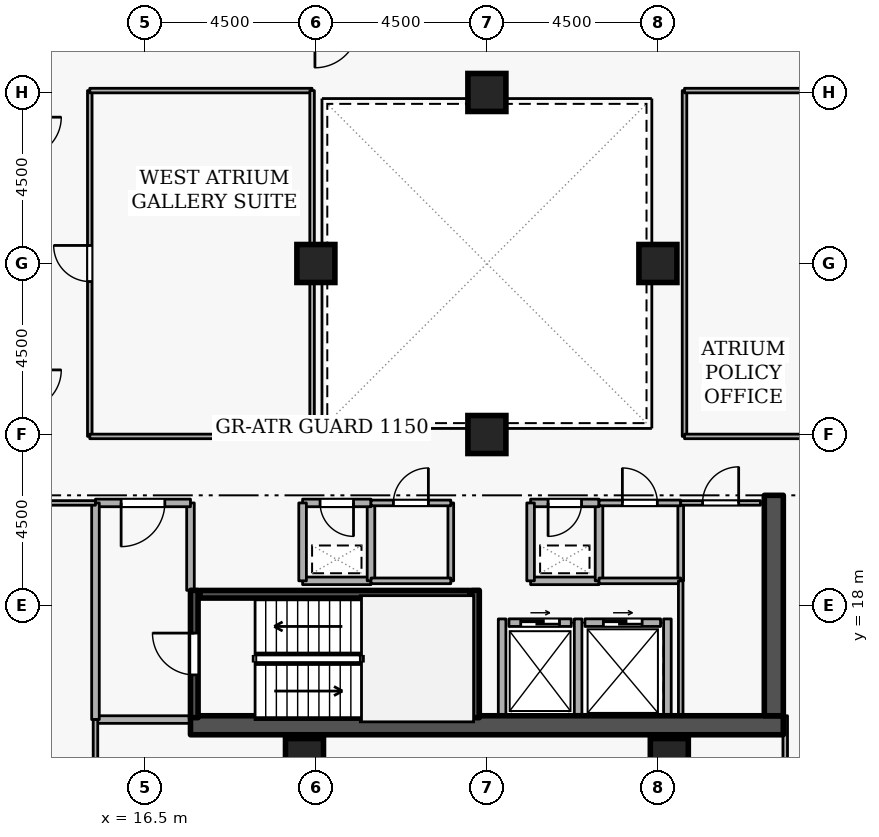
"""IFC4 building model, lengths in metres.
Left out: names, types, materials, properties, quantities, classifications, styles, units other than length and angle.
Written with IfcOpenShell. Run it as: python <this file> out.ifc"""

import sys

from ifc_helpers import new_model, si_unit, direction, frame, frame_2d, origin, origin_2d, place, context, subcontext, project, spatial, rectangle, extrude, element, fill, save


model = new_model("IFC4")
c1 = context("Model", 3, precision=1e-05, world=origin(), true_north=direction((0.0, 1.0)))
c2 = subcontext(c1, "Body", "Model", "MODEL_VIEW")
j1 = project(units=[si_unit("LENGTHUNIT", "METRE"), si_unit("PLANEANGLEUNIT", "RADIAN")], contexts=[c1])
p1 = place(None, origin())
s1 = spatial("IfcSite", under=j1, at=p1, CompositionType="ELEMENT")
p2 = place(p1, origin())
s2 = spatial("IfcBuilding", under=s1, at=p2, CompositionType="ELEMENT")
p3 = place(p2, frame((0.0, 0.0, 200.1)))
s3 = spatial("IfcBuildingStorey", under=s2, at=p3, CompositionType="ELEMENT", Elevation=200.1)
p4 = place(p3, frame((17.7, 14.85, 0.0), z_axis=(0.0, 0.0, 1.0), x_axis=(1.0, 0.0, 0.0)))
e1 = element("IfcWall", 1, at=p4, inside=s3, PredefinedType="SHEAR", context=c2, shape_type="SweptSolid", body=[
    extrude(rectangle(XDim=15.6, YDim=0.5, at=frame_2d((7.8, 0.0))), origin(), (0.0, 0.0, 1.0), 3.6),
])
p5 = place(p3, frame((33.05, 15.1, 0.0), z_axis=(0.0, 0.0, 1.0), x_axis=(0.0, 1.0, 0.0)))
e2 = element("IfcWall", 2, at=p5, inside=s3, PredefinedType="SHEAR", context=c2, shape_type="SweptSolid", body=[
    extrude(rectangle(XDim=5.8, YDim=0.5, at=frame_2d((2.9, 0.0))), origin(), (0.0, 0.0, 1.0), 3.6),
])
for number, where, z_axis, x_axis in (
    (3, (20.7, 14.0, 0.0), (0.0, 0.0, 1.0), (1.0, 0.0, 0.0)),
    (4, (30.3, 14.0, 0.0), (0.0, 0.0, 1.0), (1.0, 0.0, 0.0)),
    (5, (25.5, 22.5, 0.0), (0.0, 0.0, 1.0), (1.0, 0.0, 0.0)),
    (6, (25.5, 31.5, 0.0), (0.0, 0.0, 1.0), (1.0, 0.0, 0.0)),
    (7, (21.0, 27.0, 0.0), (0.0, 0.0, 1.0), (1.0, 0.0, 0.0)),
    (8, (30.0, 27.0, 0.0), (0.0, 0.0, 1.0), (1.0, 0.0, 0.0)),
):
    element("IfcColumn", number, at=place(p3, frame(where, z_axis=z_axis, x_axis=x_axis)), inside=s3, PredefinedType="COLUMN", context=c2, shape_type="SweptSolid", body=[
        extrude(rectangle(XDim=1.0, YDim=1.0, at=origin_2d()), origin(), (0.0, 0.0, 1.0), 3.6),
    ])
p6 = place(p3, frame((26.08, 17.55, 0.0), z_axis=(0.0, 0.0, 1.0), x_axis=(1.0, 0.0, 0.0)))
e9 = element("IfcWall", 9, at=p6, inside=s3, PredefinedType="STANDARD", context=c2, shape_type="SweptSolid", body=[
    extrude(rectangle(XDim=1.64, YDim=0.2, at=frame_2d((0.82, 0.0))), origin(), (0.0, 0.0, 1.0), 3.32),
])
p7 = place(p6, frame((0.31, 0.0, 0.0)))
e10 = element("IfcOpeningElement", 10, at=p7, cuts=e9, PredefinedType="OPENING", context=c2, shape_type="SweptSolid", body=[
    extrude(rectangle(XDim=1.02, YDim=2.06, at=frame_2d((0.51, 1.03))), frame((0.0, 0.11, 0.0), z_axis=(0.0, -1.0, 0.0), x_axis=(1.0, 0.0, 0.0)), (0.0, 0.0, 1.0), 0.22),
])
p8 = place(p3, frame((28.08, 17.55, 0.0), z_axis=(0.0, 0.0, 1.0), x_axis=(1.0, 0.0, 0.0)))
e11 = element("IfcWall", 11, at=p8, inside=s3, PredefinedType="STANDARD", context=c2, shape_type="SweptSolid", body=[
    extrude(rectangle(XDim=1.99, YDim=0.2, at=frame_2d((0.995, 0.0))), origin(), (0.0, 0.0, 1.0), 3.32),
])
p9 = place(p8, frame((0.485, 0.0, 0.0)))
e12 = element("IfcOpeningElement", 12, at=p9, cuts=e11, PredefinedType="OPENING", context=c2, shape_type="SweptSolid", body=[
    extrude(rectangle(XDim=1.02, YDim=2.06, at=frame_2d((0.51, 1.03))), frame((0.0, 0.11, 0.0), z_axis=(0.0, -1.0, 0.0), x_axis=(1.0, 0.0, 0.0)), (0.0, 0.0, 1.0), 0.22),
])
for number, where, z_axis, x_axis in (
    (13, (27.9, 15.112, 0.0), (0.0, 0.0, 1.0), (0.0, 1.0, 0.0)),
    (14, (25.9, 15.112, 0.0), (0.0, 0.0, 1.0), (0.0, 1.0, 0.0)),
    (15, (30.25, 15.112, 0.0), (0.0, 0.0, 1.0), (0.0, 1.0, 0.0)),
):
    element("IfcWall", number, at=place(p3, frame(where, z_axis=z_axis, x_axis=x_axis)), inside=s3, PredefinedType="STANDARD", context=c2, shape_type="SweptSolid", body=[
        extrude(rectangle(XDim=2.536, YDim=0.2, at=frame_2d((1.268, 0.0))), origin(), (0.0, 0.0, 1.0), 3.32),
    ])
p10 = place(p3, frame((17.8, 15.05, 0.0), z_axis=(0.0, 0.0, 1.0), x_axis=(0.0, 1.0, 0.0)))
e16 = element("IfcWall", 16, at=p10, inside=s3, PredefinedType="SHEAR", context=c2, shape_type="SweptSolid", body=[
    extrude(rectangle(XDim=3.35, YDim=0.2, at=frame_2d((1.675, 0.0))), origin(), (0.0, 0.0, 1.0), 3.6),
])
p11 = place(p10, frame((1.125, 0.0, 0.0)))
e17 = element("IfcOpeningElement", 17, at=p11, cuts=e16, PredefinedType="OPENING", context=c2, shape_type="SweptSolid", body=[
    extrude(rectangle(XDim=1.1, YDim=2.1, at=frame_2d((0.55, 1.05))), frame((0.0, 0.11, 0.0), z_axis=(0.0, -1.0, 0.0), x_axis=(1.0, 0.0, 0.0)), (0.0, 0.0, 1.0), 0.22),
])
p12 = place(p3, frame((25.2, 18.4, 0.0), z_axis=(0.0, 0.0, 1.0), x_axis=(0.0, -1.0, 0.0)))
e18 = element("IfcWall", 18, at=p12, inside=s3, PredefinedType="SHEAR", context=c2, shape_type="SweptSolid", body=[
    extrude(rectangle(XDim=3.35, YDim=0.2, at=frame_2d((1.675, 0.0))), origin(), (0.0, 0.0, 1.0), 3.6),
])
p13 = place(p3, frame((25.05, 18.297, 0.0), z_axis=(0.0, 0.0, 1.0), x_axis=(-1.0, 0.0, 0.0)))
e19 = element("IfcWall", 19, at=p13, inside=s3, PredefinedType="SHEAR", context=c2, shape_type="SweptSolid", body=[
    extrude(rectangle(XDim=7.1, YDim=0.2, at=frame_2d((3.55, 0.0))), origin(), (0.0, 0.0, 1.0), 3.6),
])
p14 = place(p3, frame((15.2, 15.0, 0.0), z_axis=(0.0, 0.0, 1.0), x_axis=(1.0, 0.0, 0.0)))
e20 = element("IfcWall", 20, at=p14, inside=s3, PredefinedType="STANDARD", context=c2, shape_type="SweptSolid", body=[
    extrude(rectangle(XDim=2.5, YDim=0.2, at=frame_2d((1.25, 0.0))), origin(), (0.0, 0.0, 1.0), 3.32),
])
p15 = place(p3, frame((17.7, 18.4, 0.0), z_axis=(0.0, 0.0, 1.0), x_axis=(0.0, 1.0, 0.0)))
e21 = element("IfcWall", 21, at=p15, inside=s3, PredefinedType="STANDARD", context=c2, shape_type="SweptSolid", body=[
    extrude(rectangle(XDim=2.3, YDim=0.2, at=frame_2d((1.15, 0.0))), origin(), (0.0, 0.0, 1.0), 2.525),
])
p16 = place(p3, frame((17.7, 20.7, 0.0), z_axis=(0.0, 0.0, 1.0), x_axis=(-1.0, 0.0, 0.0)))
e22 = element("IfcWall", 22, at=p16, inside=s3, PredefinedType="STANDARD", context=c2, shape_type="SweptSolid", body=[
    extrude(rectangle(XDim=2.5, YDim=0.2, at=frame_2d((1.25, 0.0))), origin(), (0.0, 0.0, 1.0), 3.32),
])
p17 = place(p16, frame((0.675, 0.0, 0.0)))
e23 = element("IfcOpeningElement", 23, at=p17, cuts=e22, PredefinedType="OPENING", context=c2, shape_type="SweptSolid", body=[
    extrude(rectangle(XDim=1.15, YDim=2.1, at=frame_2d((0.575, 1.05))), frame((0.0, 0.11, 0.0), z_axis=(0.0, -1.0, 0.0), x_axis=(1.0, 0.0, 0.0)), (0.0, 0.0, 1.0), 0.22),
])
p18 = place(p3, frame((15.2, 20.7, 0.0), z_axis=(0.0, 0.0, 1.0), x_axis=(0.0, -1.0, 0.0)))
e24 = element("IfcWall", 24, at=p18, inside=s3, PredefinedType="STANDARD", context=c2, shape_type="SweptSolid", body=[
    extrude(rectangle(XDim=5.7, YDim=0.2, at=frame_2d((2.85, 0.0))), origin(), (0.0, 0.0, 1.0), 3.32),
])
p19 = place(p3, frame((26.65, 18.65, 0.0), z_axis=(0.0, 0.0, 1.0), x_axis=(1.0, 0.0, 0.0)))
e25 = element("IfcWall", 25, at=p19, inside=s3, PredefinedType="STANDARD", context=c2, shape_type="SweptSolid", body=[
    extrude(rectangle(XDim=1.8, YDim=0.2, at=frame_2d((0.9, 0.0))), origin(), (0.0, 0.0, 1.0), 3.32),
])
p20 = place(p3, frame((28.45, 18.65, 0.0), z_axis=(0.0, 0.0, 1.0), x_axis=(0.0, 1.0, 0.0)))
e26 = element("IfcWall", 26, at=p20, inside=s3, PredefinedType="STANDARD", context=c2, shape_type="SweptSolid", body=[
    extrude(rectangle(XDim=2.05, YDim=0.2, at=frame_2d((1.025, 0.0))), origin(), (0.0, 0.0, 1.0), 3.32),
])
p21 = place(p3, frame((28.45, 20.7, 0.0), z_axis=(0.0, 0.0, 1.0), x_axis=(-1.0, 0.0, 0.0)))
e27 = element("IfcWall", 27, at=p21, inside=s3, PredefinedType="STANDARD", context=c2, shape_type="SweptSolid", body=[
    extrude(rectangle(XDim=1.8, YDim=0.2, at=frame_2d((0.9, 0.0))), origin(), (0.0, 0.0, 1.0), 3.32),
])
p22 = place(p21, frame((0.46, 0.0, 0.0)))
e28 = element("IfcOpeningElement", 28, at=p22, cuts=e27, PredefinedType="OPENING", context=c2, shape_type="SweptSolid", body=[
    extrude(rectangle(XDim=0.88, YDim=2.04, at=frame_2d((0.44, 1.02))), frame((0.0, 0.11, 0.0), z_axis=(0.0, -1.0, 0.0), x_axis=(1.0, 0.0, 0.0)), (0.0, 0.0, 1.0), 0.22),
])
p23 = place(p3, frame((26.65, 20.7, 0.0), z_axis=(0.0, 0.0, 1.0), x_axis=(0.0, -1.0, 0.0)))
e29 = element("IfcWall", 29, at=p23, inside=s3, PredefinedType="STANDARD", context=c2, shape_type="SweptSolid", body=[
    extrude(rectangle(XDim=2.05, YDim=0.2, at=frame_2d((1.025, 0.0))), origin(), (0.0, 0.0, 1.0), 3.32),
])
p24 = place(p3, frame((20.65, 18.65, 0.0), z_axis=(0.0, 0.0, 1.0), x_axis=(1.0, 0.0, 0.0)))
e30 = element("IfcWall", 30, at=p24, inside=s3, PredefinedType="STANDARD", context=c2, shape_type="SweptSolid", body=[
    extrude(rectangle(XDim=1.8, YDim=0.2, at=frame_2d((0.9, 0.0))), origin(), (0.0, 0.0, 1.0), 3.32),
])
p25 = place(p3, frame((22.45, 18.65, 0.0), z_axis=(0.0, 0.0, 1.0), x_axis=(0.0, 1.0, 0.0)))
e31 = element("IfcWall", 31, at=p25, inside=s3, PredefinedType="STANDARD", context=c2, shape_type="SweptSolid", body=[
    extrude(rectangle(XDim=2.05, YDim=0.2, at=frame_2d((1.025, 0.0))), origin(), (0.0, 0.0, 1.0), 3.32),
])
p26 = place(p3, frame((22.45, 20.7, 0.0), z_axis=(0.0, 0.0, 1.0), x_axis=(-1.0, 0.0, 0.0)))
e32 = element("IfcWall", 32, at=p26, inside=s3, PredefinedType="STANDARD", context=c2, shape_type="SweptSolid", body=[
    extrude(rectangle(XDim=1.8, YDim=0.2, at=frame_2d((0.9, 0.0))), origin(), (0.0, 0.0, 1.0), 3.32),
])
p27 = place(p26, frame((0.46, 0.0, 0.0)))
e33 = element("IfcOpeningElement", 33, at=p27, cuts=e32, PredefinedType="OPENING", context=c2, shape_type="SweptSolid", body=[
    extrude(rectangle(XDim=0.88, YDim=2.04, at=frame_2d((0.44, 1.02))), frame((0.0, 0.11, 0.0), z_axis=(0.0, -1.0, 0.0), x_axis=(1.0, 0.0, 0.0)), (0.0, 0.0, 1.0), 0.22),
])
p28 = place(p3, frame((20.65, 20.7, 0.0), z_axis=(0.0, 0.0, 1.0), x_axis=(0.0, -1.0, 0.0)))
e34 = element("IfcWall", 34, at=p28, inside=s3, PredefinedType="STANDARD", context=c2, shape_type="SweptSolid", body=[
    extrude(rectangle(XDim=2.05, YDim=0.2, at=frame_2d((1.025, 0.0))), origin(), (0.0, 0.0, 1.0), 3.32),
])
p29 = place(p3, frame((24.55, 20.7, 0.0), z_axis=(0.0, 0.0, 1.0), x_axis=(0.0, -1.0, 0.0)))
e35 = element("IfcWall", 35, at=p29, inside=s3, PredefinedType="PARTITIONING", context=c2, shape_type="SweptSolid", body=[
    extrude(rectangle(XDim=2.05, YDim=0.15, at=frame_2d((1.025, 0.0))), origin(), (0.0, 0.0, 1.0), 3.32),
])
p30 = place(p3, frame((24.55, 18.65, 0.0), z_axis=(0.0, 0.0, 1.0), x_axis=(-1.0, 0.0, 0.0)))
e36 = element("IfcWall", 36, at=p30, inside=s3, PredefinedType="PARTITIONING", context=c2, shape_type="SweptSolid", body=[
    extrude(rectangle(XDim=2.1, YDim=0.15, at=frame_2d((1.05, 0.0))), origin(), (0.0, 0.0, 1.0), 3.32),
])
p31 = place(p3, frame((22.45, 20.7, 0.0), z_axis=(0.0, 0.0, 1.0), x_axis=(1.0, 0.0, 0.0)))
e37 = element("IfcWall", 37, at=p31, inside=s3, PredefinedType="PARTITIONING", context=c2, shape_type="SweptSolid", body=[
    extrude(rectangle(XDim=2.1, YDim=0.15, at=frame_2d((1.05, 0.0))), origin(), (0.0, 0.0, 1.0), 3.32),
])
p32 = place(p31, frame((0.59, 0.0, 0.0)))
e38 = element("IfcOpeningElement", 38, at=p32, cuts=e37, PredefinedType="OPENING", context=c2, shape_type="SweptSolid", body=[
    extrude(rectangle(XDim=0.92, YDim=2.08, at=frame_2d((0.46, 1.04))), frame((0.0, 0.085, 0.0), z_axis=(0.0, -1.0, 0.0), x_axis=(1.0, 0.0, 0.0)), (0.0, 0.0, 1.0), 0.17),
])
p33 = place(p3, frame((30.6, 20.7, 0.0), z_axis=(0.0, 0.0, 1.0), x_axis=(0.0, -1.0, 0.0)))
e39 = element("IfcWall", 39, at=p33, inside=s3, PredefinedType="PARTITIONING", context=c2, shape_type="SweptSolid", body=[
    extrude(rectangle(XDim=2.05, YDim=0.15, at=frame_2d((1.025, 0.0))), origin(), (0.0, 0.0, 1.0), 3.32),
])
p34 = place(p3, frame((30.6, 18.65, 0.0), z_axis=(0.0, 0.0, 1.0), x_axis=(-1.0, 0.0, 0.0)))
e40 = element("IfcWall", 40, at=p34, inside=s3, PredefinedType="PARTITIONING", context=c2, shape_type="SweptSolid", body=[
    extrude(rectangle(XDim=2.15, YDim=0.15, at=frame_2d((1.075, 0.0))), origin(), (0.0, 0.0, 1.0), 3.32),
])
p35 = place(p3, frame((28.45, 20.7, 0.0), z_axis=(0.0, 0.0, 1.0), x_axis=(1.0, 0.0, 0.0)))
e41 = element("IfcWall", 41, at=p35, inside=s3, PredefinedType="PARTITIONING", context=c2, shape_type="SweptSolid", body=[
    extrude(rectangle(XDim=2.15, YDim=0.15, at=frame_2d((1.075, 0.0))), origin(), (0.0, 0.0, 1.0), 3.32),
])
p36 = place(p35, frame((0.615, 0.0, 0.0)))
e42 = element("IfcOpeningElement", 42, at=p36, cuts=e41, PredefinedType="OPENING", context=c2, shape_type="SweptSolid", body=[
    extrude(rectangle(XDim=0.92, YDim=2.08, at=frame_2d((0.46, 1.04))), frame((0.0, 0.085, 0.0), z_axis=(0.0, -1.0, 0.0), x_axis=(1.0, 0.0, 0.0)), (0.0, 0.0, 1.0), 0.17),
])
p37 = place(p3, frame((30.6, 15.1, 0.0), z_axis=(0.0, 0.0, 1.0), x_axis=(0.0, 1.0, 0.0)))
e43 = element("IfcWall", 43, at=p37, inside=s3, PredefinedType="PARTITIONING", context=c2, shape_type="SweptSolid", body=[
    extrude(rectangle(XDim=3.55, YDim=0.12, at=frame_2d((1.775, 0.0))), origin(), (0.0, 0.0, 1.0), 3.32),
])
p38 = place(p3, frame((30.6, 20.7, 0.0), z_axis=(0.0, 0.0, 1.0), x_axis=(1.0, 0.0, 0.0)))
e44 = element("IfcWall", 44, at=p38, inside=s3, PredefinedType="PARTITIONING", context=c2, shape_type="SweptSolid", body=[
    extrude(rectangle(XDim=2.1, YDim=0.12, at=frame_2d((1.05, 0.0))), origin(), (0.0, 0.0, 1.0), 3.32),
])
p39 = place(p38, frame((0.575, 0.0, 0.0)))
e45 = element("IfcOpeningElement", 45, at=p39, cuts=e44, PredefinedType="OPENING", context=c2, shape_type="SweptSolid", body=[
    extrude(rectangle(XDim=0.95, YDim=2.1, at=frame_2d((0.475, 1.05))), frame((0.0, 0.07, 0.0), z_axis=(0.0, -1.0, 0.0), x_axis=(1.0, 0.0, 0.0)), (0.0, 0.0, 1.0), 0.14),
])
p40 = place(p3, frame((33.35, 9.28, 0.0), z_axis=(0.0, 0.0, 1.0), x_axis=(0.0, 1.0, 0.0)))
e46 = element("IfcWall", 46, at=p40, inside=s3, PredefinedType="PARTITIONING", context=c2, shape_type="SweptSolid", body=[
    extrude(rectangle(XDim=5.82, YDim=0.12, at=frame_2d((2.91, 0.0))), origin(), (0.0, 0.0, 1.0), 2.525),
])
p41 = place(p3, frame((13.25, 20.7, 0.0), z_axis=(0.0, 0.0, 1.0), x_axis=(1.0, 0.0, 0.0)))
e47 = element("IfcWall", 47, at=p41, inside=s3, PredefinedType="PARTITIONING", context=c2, shape_type="SweptSolid", body=[
    extrude(rectangle(XDim=1.95, YDim=0.12, at=frame_2d((0.975, 0.0))), origin(), (0.0, 0.0, 1.0), 3.32),
])
p42 = place(p3, frame((15.2, 15.0, 0.0), z_axis=(0.0, 0.0, 1.0), x_axis=(0.0, -1.0, 0.0)))
e48 = element("IfcWall", 48, at=p42, inside=s3, PredefinedType="PARTITIONING", context=c2, shape_type="SweptSolid", body=[
    extrude(rectangle(XDim=5.72, YDim=0.12, at=frame_2d((2.86, 0.0))), origin(), (0.0, 0.0, 1.0), 3.32),
])
p43 = place(p3, frame((15.05, 22.45, 0.0), z_axis=(0.0, 0.0, 1.0), x_axis=(0.0, 1.0, 0.0)))
e49 = element("IfcWall", 49, at=p43, inside=s3, PredefinedType="PARTITIONING", context=c2, shape_type="SweptSolid", body=[
    extrude(rectangle(XDim=9.1, YDim=0.12, at=frame_2d((4.55, 0.0))), origin(), (0.0, 0.0, 1.0), 3.32),
])
p44 = place(p43, frame((4.075, 0.0, 0.0)))
e50 = element("IfcOpeningElement", 50, at=p44, cuts=e49, PredefinedType="OPENING", context=c2, shape_type="SweptSolid", body=[
    extrude(rectangle(XDim=0.95, YDim=2.1, at=frame_2d((0.475, 1.05))), frame((0.0, 0.07, 0.0), z_axis=(0.0, -1.0, 0.0), x_axis=(1.0, 0.0, 0.0)), (0.0, 0.0, 1.0), 0.14),
])
p45 = place(p3, frame((15.05, 31.55, 0.0), z_axis=(0.0, 0.0, 1.0), x_axis=(1.0, 0.0, 0.0)))
e51 = element("IfcWall", 51, at=p45, inside=s3, PredefinedType="PARTITIONING", context=c2, shape_type="SweptSolid", body=[
    extrude(rectangle(XDim=5.85, YDim=0.12, at=frame_2d((2.925, 0.0))), origin(), (0.0, 0.0, 1.0), 3.32),
])
p46 = place(p3, frame((20.9, 31.55, 0.0), z_axis=(0.0, 0.0, 1.0), x_axis=(0.0, -1.0, 0.0)))
e52 = element("IfcWall", 52, at=p46, inside=s3, PredefinedType="PARTITIONING", context=c2, shape_type="SweptSolid", body=[
    extrude(rectangle(XDim=9.1, YDim=0.12, at=frame_2d((4.55, 0.0))), origin(), (0.0, 0.0, 1.0), 3.32),
])
p47 = place(p3, frame((20.9, 22.45, 0.0), z_axis=(0.0, 0.0, 1.0), x_axis=(-1.0, 0.0, 0.0)))
e53 = element("IfcWall", 53, at=p47, inside=s3, PredefinedType="PARTITIONING", context=c2, shape_type="SweptSolid", body=[
    extrude(rectangle(XDim=5.85, YDim=0.12, at=frame_2d((2.925, 0.0))), origin(), (0.0, 0.0, 1.0), 3.32),
])
p48 = place(p3, frame((30.7, 22.45, 0.0), z_axis=(0.0, 0.0, 1.0), x_axis=(0.0, 1.0, 0.0)))
e54 = element("IfcWall", 54, at=p48, inside=s3, PredefinedType="PARTITIONING", context=c2, shape_type="SweptSolid", body=[
    extrude(rectangle(XDim=9.1, YDim=0.12, at=frame_2d((4.55, 0.0))), origin(), (0.0, 0.0, 1.0), 3.32),
])
for number, where, z_axis, x_axis in (
    (55, (30.7, 31.55, 0.0), (0.0, 0.0, 1.0), (1.0, 0.0, 0.0)),
    (56, (33.95, 22.45, 0.0), (0.0, 0.0, 1.0), (-1.0, 0.0, 0.0)),
):
    element("IfcWall", number, at=place(p3, frame(where, z_axis=z_axis, x_axis=x_axis)), inside=s3, PredefinedType="PARTITIONING", context=c2, shape_type="SweptSolid", body=[
        extrude(rectangle(XDim=3.25, YDim=0.12, at=frame_2d((1.625, 0.0))), origin(), (0.0, 0.0, 1.0), 3.32),
    ])
p49 = place(p7, origin())
e57 = element("IfcDoor", 57, at=p49, inside=s3, OperationType="SLIDING_TO_LEFT", PredefinedType="DOOR", context=c2, shape_type="SweptSolid", body=[
    extrude(rectangle(XDim=1.02, YDim=2.06, at=frame_2d((0.51, 1.03))), frame((0.0, 0.025, 0.0), z_axis=(0.0, -1.0, 0.0), x_axis=(1.0, 0.0, 0.0)), (0.0, 0.0, 1.0), 0.05),
])
fill(e10, e57)
p50 = place(p9, origin())
e58 = element("IfcDoor", 58, at=p50, inside=s3, OperationType="SLIDING_TO_LEFT", PredefinedType="DOOR", context=c2, shape_type="SweptSolid", body=[
    extrude(rectangle(XDim=1.02, YDim=2.06, at=frame_2d((0.51, 1.03))), frame((0.0, 0.025, 0.0), z_axis=(0.0, -1.0, 0.0), x_axis=(1.0, 0.0, 0.0)), (0.0, 0.0, 1.0), 0.05),
])
fill(e12, e58)
p51 = place(p11, origin())
e59 = element("IfcDoor", 59, at=p51, inside=s3, OperationType="SINGLE_SWING_RIGHT", PredefinedType="DOOR", context=c2, shape_type="SweptSolid", body=[
    extrude(rectangle(XDim=1.1, YDim=2.1, at=frame_2d((0.55, 1.05))), frame((0.0, 0.025, 0.0), z_axis=(0.0, -1.0, 0.0), x_axis=(1.0, 0.0, 0.0)), (0.0, 0.0, 1.0), 0.05),
])
fill(e17, e59)
p52 = place(p17, origin())
e60 = element("IfcDoor", 60, at=p52, inside=s3, OperationType="SINGLE_SWING_RIGHT", PredefinedType="DOOR", context=c2, shape_type="SweptSolid", body=[
    extrude(rectangle(XDim=1.15, YDim=2.1, at=frame_2d((0.575, 1.05))), frame((0.0, 0.025, 0.0), z_axis=(0.0, -1.0, 0.0), x_axis=(1.0, 0.0, 0.0)), (0.0, 0.0, 1.0), 0.05),
])
fill(e23, e60)
p53 = place(p22, origin())
e61 = element("IfcDoor", 61, at=p53, inside=s3, OperationType="SINGLE_SWING_RIGHT", PredefinedType="DOOR", context=c2, shape_type="SweptSolid", body=[
    extrude(rectangle(XDim=0.88, YDim=2.04, at=frame_2d((0.44, 1.02))), frame((0.0, 0.025, 0.0), z_axis=(0.0, -1.0, 0.0), x_axis=(1.0, 0.0, 0.0)), (0.0, 0.0, 1.0), 0.05),
])
fill(e28, e61)
p54 = place(p27, origin())
e62 = element("IfcDoor", 62, at=p54, inside=s3, OperationType="SINGLE_SWING_LEFT", PredefinedType="DOOR", context=c2, shape_type="SweptSolid", body=[
    extrude(rectangle(XDim=0.88, YDim=2.04, at=frame_2d((0.44, 1.02))), frame((0.0, 0.025, 0.0), z_axis=(0.0, -1.0, 0.0), x_axis=(1.0, 0.0, 0.0)), (0.0, 0.0, 1.0), 0.05),
])
fill(e33, e62)
p55 = place(p32, origin())
e63 = element("IfcDoor", 63, at=p55, inside=s3, OperationType="SINGLE_SWING_RIGHT", PredefinedType="DOOR", context=c2, shape_type="SweptSolid", body=[
    extrude(rectangle(XDim=0.92, YDim=2.08, at=frame_2d((0.46, 1.04))), frame((0.0, 0.025, 0.0), z_axis=(0.0, -1.0, 0.0), x_axis=(1.0, 0.0, 0.0)), (0.0, 0.0, 1.0), 0.05),
])
fill(e38, e63)
p56 = place(p36, origin())
e64 = element("IfcDoor", 64, at=p56, inside=s3, OperationType="SINGLE_SWING_LEFT", PredefinedType="DOOR", context=c2, shape_type="SweptSolid", body=[
    extrude(rectangle(XDim=0.92, YDim=2.08, at=frame_2d((0.46, 1.04))), frame((0.0, 0.025, 0.0), z_axis=(0.0, -1.0, 0.0), x_axis=(1.0, 0.0, 0.0)), (0.0, 0.0, 1.0), 0.05),
])
fill(e42, e64)
p57 = place(p39, origin())
e65 = element("IfcDoor", 65, at=p57, inside=s3, OperationType="SINGLE_SWING_RIGHT", PredefinedType="DOOR", context=c2, shape_type="SweptSolid", body=[
    extrude(rectangle(XDim=0.95, YDim=2.1, at=frame_2d((0.475, 1.05))), frame((0.0, 0.025, 0.0), z_axis=(0.0, -1.0, 0.0), x_axis=(1.0, 0.0, 0.0)), (0.0, 0.0, 1.0), 0.05),
])
fill(e45, e65)
p58 = place(p44, origin())
e66 = element("IfcDoor", 66, at=p58, inside=s3, OperationType="SINGLE_SWING_RIGHT", PredefinedType="DOOR", context=c2, shape_type="SweptSolid", body=[
    extrude(rectangle(XDim=0.95, YDim=2.1, at=frame_2d((0.475, 1.05))), frame((0.0, 0.025, 0.0), z_axis=(0.0, -1.0, 0.0), x_axis=(1.0, 0.0, 0.0)), (0.0, 0.0, 1.0), 0.05),
])
fill(e50, e66)
save(model, sys.argv[1])
